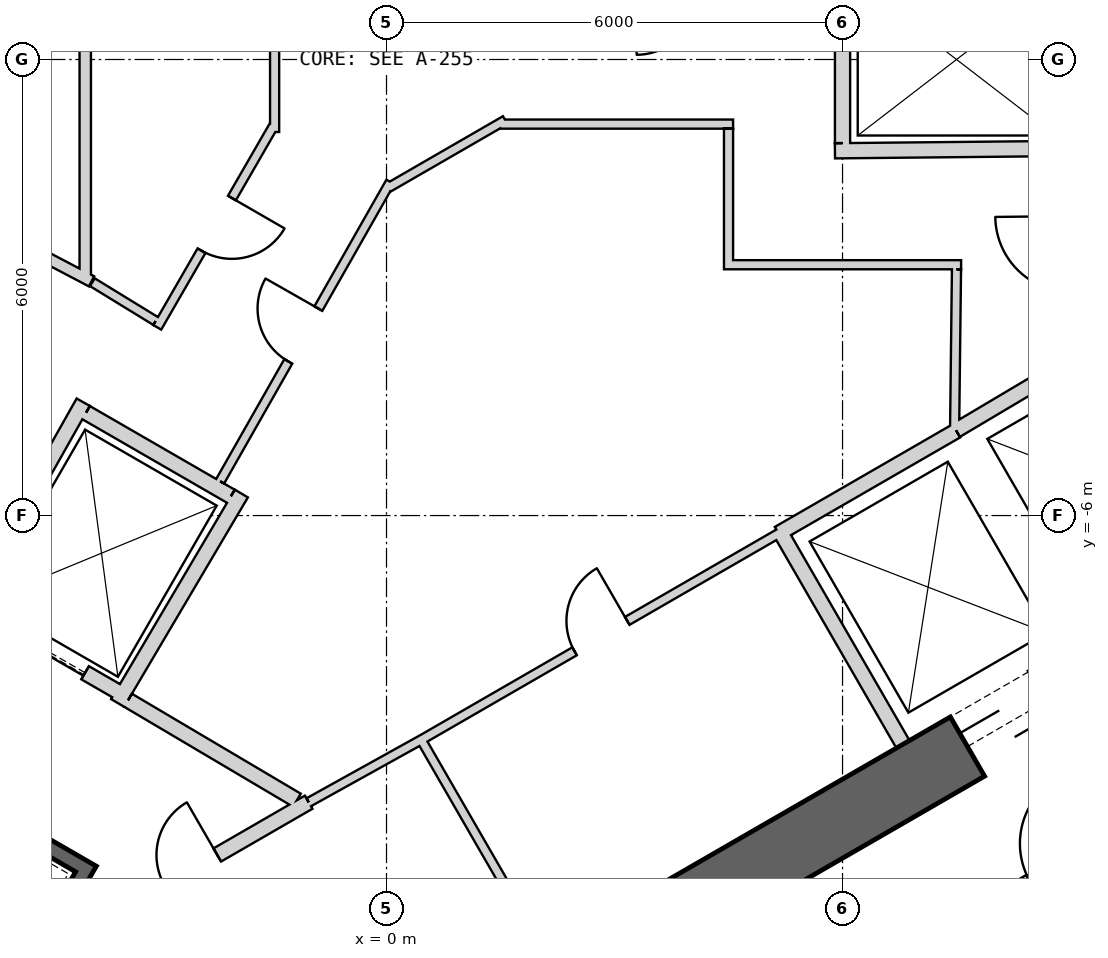
"""IFC4 building model, lengths in metres.
Left out: names, types, materials, properties, quantities, classifications, styles, units other than length and angle.
Written with IfcOpenShell. Run it as: python <this file> out.ifc"""

import sys

from ifc_helpers import new_model, si_unit, direction, frame, frame_2d, origin, place, context, subcontext, project, spatial, rectangle, extrude, element, fill, save


model = new_model("IFC4")
c1 = context("Model", 3, precision=1e-05, world=origin(), true_north=direction((0.0, 1.0)))
c2 = subcontext(c1, "Body", "Model", "MODEL_VIEW")
j1 = project(units=[si_unit("LENGTHUNIT", "METRE"), si_unit("PLANEANGLEUNIT", "RADIAN")], contexts=[c1])
p1 = place(None, origin())
s1 = spatial("IfcSite", under=j1, at=p1, CompositionType="ELEMENT")
p2 = place(p1, origin())
s2 = spatial("IfcBuilding", under=s1, at=p2, CompositionType="ELEMENT")
p3 = place(p2, frame((0.0, 0.0, 435.3)))
s3 = spatial("IfcBuildingStorey", under=s2, at=p3, CompositionType="ELEMENT", Elevation=435.3)
p4 = place(p3, frame((-7.825, -17.97, 0.0), z_axis=(0.0, 0.0, 1.0), x_axis=(0.866028369851, 0.499994862586, 0.0)))
e1 = element("IfcWall", 1, at=p4, inside=s3, PredefinedType="SHEAR", context=c2, shape_type="SweptSolid", body=[
    extrude(rectangle(XDim=31.523, YDim=0.9, at=frame_2d((15.762, 0.0))), origin(), (0.0, 0.0, 1.0), 5.0),
])
p5 = place(p4, frame((17.862, 0.0, 0.0)))
e2 = element("IfcOpeningElement", 2, at=p5, cuts=e1, PredefinedType="OPENING", context=c2, shape_type="SweptSolid", body=[
    extrude(rectangle(XDim=1.2, YDim=2.4, at=frame_2d((0.6, 1.2))), frame((0.0, 0.46, 0.0), z_axis=(0.0, -1.0, 0.0), x_axis=(1.0, 0.0, 0.0)), (0.0, 0.0, 1.0), 0.92),
])
p6 = place(p4, frame((20.562, 0.0, 0.0)))
e3 = element("IfcOpeningElement", 3, at=p6, cuts=e1, PredefinedType="OPENING", context=c2, shape_type="SweptSolid", body=[
    extrude(rectangle(XDim=1.2, YDim=2.4, at=frame_2d((0.6, 1.2))), frame((0.0, 0.46, 0.0), z_axis=(0.0, -1.0, 0.0), x_axis=(1.0, 0.0, 0.0)), (0.0, 0.0, 1.0), 0.92),
])
p7 = place(p4, frame((26.712, 0.0, 0.0)))
e4 = element("IfcOpeningElement", 4, at=p7, cuts=e1, PredefinedType="OPENING", context=c2, shape_type="SweptSolid", body=[
    extrude(rectangle(XDim=1.2, YDim=2.4, at=frame_2d((0.6, 1.2))), frame((0.0, 0.46, 0.0), z_axis=(0.0, -1.0, 0.0), x_axis=(1.0, 0.0, 0.0)), (0.0, 0.0, 1.0), 0.92),
])
p8 = place(p4, frame((3.612, 0.0, 0.0)))
e5 = element("IfcOpeningElement", 5, at=p8, cuts=e1, PredefinedType="OPENING", context=c2, shape_type="SweptSolid", body=[
    extrude(rectangle(XDim=1.2, YDim=2.4, at=frame_2d((0.6, 1.2))), frame((0.0, 0.46, 0.0), z_axis=(0.0, -1.0, 0.0), x_axis=(1.0, 0.0, 0.0)), (0.0, 0.0, 1.0), 0.92),
])
p9 = place(p3, frame((6.795, -9.01, 0.0), z_axis=(0.0, 0.0, 1.0), x_axis=(-0.499984717929, 0.866034226713, 0.0)))
e6 = element("IfcWall", 6, at=p9, inside=s3, PredefinedType="PLUMBINGWALL", context=c2, shape_type="SweptSolid", body=[
    extrude(rectangle(XDim=3.25, YDim=0.2, at=frame_2d((1.625, 0.0))), origin(), (0.0, 0.0, 1.0), 4.75),
])
p10 = place(p3, frame((5.159, -6.236, 0.0), z_axis=(0.0, 0.0, 1.0), x_axis=(0.866036505625, 0.499980770555, 0.0)))
e7 = element("IfcWall", 7, at=p10, inside=s3, PredefinedType="PLUMBINGWALL", context=c2, shape_type="SweptSolid", body=[
    extrude(rectangle(XDim=2.7, YDim=0.2, at=frame_2d((1.35, 0.0))), origin(), (0.0, 0.0, 1.0), 4.75),
])
p11 = place(p3, frame((7.493, -4.878, 0.0), z_axis=(0.0, 0.0, 1.0), x_axis=(0.859981807212, 0.510324691999, 0.0)))
e8 = element("IfcWall", 8, at=p11, inside=s3, PredefinedType="PLUMBINGWALL", context=c2, shape_type="SweptSolid", body=[
    extrude(rectangle(XDim=1.845, YDim=0.2, at=frame_2d((0.922, 0.0))), origin(), (0.0, 0.0, 1.0), 4.75),
])
p12 = place(p3, frame((6.0, -1.1, 0.0), z_axis=(0.0, 0.0, 1.0), x_axis=(0.0, 1.0, 0.0)))
e9 = element("IfcWall", 9, at=p12, inside=s3, PredefinedType="PLUMBINGWALL", context=c2, shape_type="SweptSolid", body=[
    extrude(rectangle(XDim=2.2, YDim=0.2, at=frame_2d((1.1, 0.0))), origin(), (0.0, 0.0, 1.0), 4.75),
])
p13 = place(p3, frame((5.9, -1.201, 0.0), z_axis=(0.0, 0.0, 1.0), x_axis=(0.999950064753, 0.009993397809, 0.0)))
e10 = element("IfcWall", 10, at=p13, inside=s3, PredefinedType="PLUMBINGWALL", context=c2, shape_type="SweptSolid", body=[
    extrude(rectangle(XDim=3.2, YDim=0.2, at=frame_2d((1.6, 0.0))), origin(), (0.0, 0.0, 1.0), 4.75),
])
p14 = place(p3, frame((-3.905, -10.563, -0.25), z_axis=(0.0, 0.0, 1.0), x_axis=(-0.500012932018, -0.866017937352, 0.0)))
e11 = element("IfcWall", 11, at=p14, inside=s3, PredefinedType="SHEAR", context=c2, shape_type="SweptSolid", body=[
    extrude(rectangle(XDim=8.1, YDim=0.2, at=frame_2d((4.05, 0.0))), origin(), (0.0, 0.0, 1.0), 5.0),
])
p15 = place(p3, frame((-4.041, -10.599, -0.25), z_axis=(0.0, 0.0, 1.0), x_axis=(-0.866047807691, 0.499961193289, 0.0)))
e12 = element("IfcWall", 12, at=p15, inside=s3, PredefinedType="SHEAR", context=c2, shape_type="SweptSolid", body=[
    extrude(rectangle(XDim=3.6, YDim=0.2, at=frame_2d((1.8, 0.0))), origin(), (0.0, 0.0, 1.0), 5.0),
])
p16 = place(p15, frame((1.25, 0.0, 0.25)))
e13 = element("IfcOpeningElement", 13, at=p16, cuts=e12, PredefinedType="OPENING", context=c2, shape_type="SweptSolid", body=[
    extrude(rectangle(XDim=1.1, YDim=2.1, at=frame_2d((0.55, 1.05))), frame((0.0, 0.11, 0.0), z_axis=(0.0, -1.0, 0.0), x_axis=(1.0, 0.0, 0.0)), (0.0, 0.0, 1.0), 0.22),
])
p17 = place(p3, frame((-3.446, -8.368, 0.0), z_axis=(0.0, 0.0, 1.0), x_axis=(-0.866024647952, 0.500001309137, 0.0)))
e14 = element("IfcWall", 14, at=p17, inside=s3, PredefinedType="PLUMBINGWALL", context=c2, shape_type="SweptSolid", body=[
    extrude(rectangle(XDim=2.4, YDim=0.2, at=frame_2d((1.2, 0.0))), origin(), (0.0, 0.0, 1.0), 4.75),
])
p18 = place(p17, frame((0.6, 0.0, 0.0)))
e15 = element("IfcOpeningElement", 15, at=p18, cuts=e14, PredefinedType="OPENING", context=c2, shape_type="SweptSolid", body=[
    extrude(rectangle(XDim=1.2, YDim=2.4, at=frame_2d((0.6, 1.2))), frame((0.0, 0.11, 0.0), z_axis=(0.0, -1.0, 0.0), x_axis=(1.0, 0.0, 0.0)), (0.0, 0.0, 1.0), 0.22),
])
p19 = place(p3, frame((-3.953, -4.646, 0.0), z_axis=(0.0, 0.0, 1.0), x_axis=(0.86605622881, -0.499946605688, 0.0)))
e16 = element("IfcWall", 16, at=p19, inside=s3, PredefinedType="PLUMBINGWALL", context=c2, shape_type="SweptSolid", body=[
    extrude(rectangle(XDim=2.2, YDim=0.2, at=frame_2d((1.1, 0.0))), origin(), (0.0, 0.0, 1.0), 4.75),
])
p20 = place(p3, frame((-1.91, -5.71, 0.0), z_axis=(0.0, 0.0, 1.0), x_axis=(-0.508616218331, -0.860993346345, 0.0)))
e17 = element("IfcWall", 17, at=p20, inside=s3, PredefinedType="PLUMBINGWALL", context=c2, shape_type="SweptSolid", body=[
    extrude(rectangle(XDim=3.2, YDim=0.2, at=frame_2d((1.6, 0.0))), origin(), (0.0, 0.0, 1.0), 4.75),
])
p21 = place(p3, frame((-3.99, -4.509, 0.0), z_axis=(0.0, 0.0, 1.0), x_axis=(-0.491358283181, -0.870957540612, 0.0)))
e18 = element("IfcWall", 18, at=p21, inside=s3, PredefinedType="PLUMBINGWALL", context=c2, shape_type="SweptSolid", body=[
    extrude(rectangle(XDim=3.2, YDim=0.2, at=frame_2d((1.6, 0.0))), origin(), (0.0, 0.0, 1.0), 4.75),
])
p22 = place(p3, frame((2.067, -11.74, 0.0), z_axis=(0.0, 0.0, 1.0), x_axis=(-0.499984717929, 0.866034226713, 0.0)))
e19 = element("IfcWall", 19, at=p22, inside=s3, PredefinedType="PARTITIONING", context=c2, shape_type="SweptSolid", body=[
    extrude(rectangle(XDim=3.25, YDim=0.12, at=frame_2d((1.625, 0.0))), origin(), (0.0, 0.0, 1.0), 4.75),
])
p23 = place(p3, frame((-1.024, -9.771, 0.0), z_axis=(0.0, 0.0, 1.0), x_axis=(-0.866029903013, -0.499992207027, 0.0)))
e20 = element("IfcWall", 20, at=p23, inside=s3, PredefinedType="PARTITIONING", context=c2, shape_type="SweptSolid", body=[
    extrude(rectangle(XDim=3.578, YDim=0.2, at=frame_2d((1.789, 0.0))), origin(), (0.0, 0.0, 1.0), 4.75),
])
p24 = place(p23, frame((1.389, 0.0, 0.0)))
e21 = element("IfcOpeningElement", 21, at=p24, cuts=e20, PredefinedType="OPENING", context=c2, shape_type="SweptSolid", body=[
    extrude(rectangle(XDim=0.8, YDim=2.1, at=frame_2d((0.4, 1.05))), frame((0.0, 0.11, 0.0), z_axis=(0.0, -1.0, 0.0), x_axis=(1.0, 0.0, 0.0)), (0.0, 0.0, 1.0), 0.22),
])
p25 = place(p3, frame((-1.023, -9.772, 0.0), z_axis=(0.0, 0.0, 1.0), x_axis=(0.874290944206, 0.485402250592, 0.0)))
e22 = element("IfcWall", 22, at=p25, inside=s3, PredefinedType="PARTITIONING", context=c2, shape_type="SweptSolid", body=[
    extrude(rectangle(XDim=1.723, YDim=0.12, at=frame_2d((0.861, 0.0))), origin(), (0.0, 0.0, 1.0), 4.75),
])
p26 = place(p3, frame((0.483, -8.936, 0.0), z_axis=(0.0, 0.0, 1.0), x_axis=(0.866028230842, 0.499995103361, 0.0)))
e23 = element("IfcWall", 23, at=p26, inside=s3, PredefinedType="PARTITIONING", context=c2, shape_type="SweptSolid", body=[
    extrude(rectangle(XDim=5.4, YDim=0.12, at=frame_2d((2.7, 0.0))), origin(), (0.0, 0.0, 1.0), 4.75),
])
p27 = place(p26, frame((2.3, 0.0, 0.0)))
e24 = element("IfcOpeningElement", 24, at=p27, cuts=e23, PredefinedType="OPENING", context=c2, shape_type="SweptSolid", body=[
    extrude(rectangle(XDim=0.8, YDim=2.1, at=frame_2d((0.4, 1.05))), frame((0.0, 0.07, 0.0), z_axis=(0.0, -1.0, 0.0), x_axis=(1.0, 0.0, 0.0)), (0.0, 0.0, 1.0), 0.14),
])
p28 = place(p3, frame((-3.401, -8.43, 0.0), z_axis=(0.0, 0.0, 1.0), x_axis=(0.860630814782, -0.509229418482, 0.0)))
e25 = element("IfcWall", 25, at=p28, inside=s3, PredefinedType="PARTITIONING", context=c2, shape_type="SweptSolid", body=[
    extrude(rectangle(XDim=2.582, YDim=0.2, at=frame_2d((1.291, 0.0))), origin(), (0.0, 0.0, 1.0), 4.75),
])
p29 = place(p3, frame((0.051, -1.611, 0.0), z_axis=(0.0, 0.0, 1.0), x_axis=(-0.49434454467, -0.869266053148, 0.0)))
e26 = element("IfcWall", 26, at=p29, inside=s3, PredefinedType="PARTITIONING", context=c2, shape_type="SweptSolid", body=[
    extrude(rectangle(XDim=4.53, YDim=0.12, at=frame_2d((2.265, 0.0))), origin(), (0.0, 0.0, 1.0), 4.75),
])
p30 = place(p29, frame((1.916, 0.0, 0.0)))
e27 = element("IfcOpeningElement", 27, at=p30, cuts=e26, PredefinedType="OPENING", context=c2, shape_type="SweptSolid", body=[
    extrude(rectangle(XDim=0.8, YDim=2.1, at=frame_2d((0.4, 1.05))), frame((0.0, 0.07, 0.0), z_axis=(0.0, -1.0, 0.0), x_axis=(1.0, 0.0, 0.0)), (0.0, 0.0, 1.0), 0.14),
])
p31 = place(p3, frame((1.562, -0.798, 0.0), z_axis=(0.0, 0.0, 1.0), x_axis=(-0.86601248742, -0.500022371132, 0.0)))
e28 = element("IfcWall", 28, at=p31, inside=s3, PredefinedType="PARTITIONING", context=c2, shape_type="SweptSolid", body=[
    extrude(rectangle(XDim=1.785, YDim=0.12, at=frame_2d((0.893, 0.0))), origin(), (0.0, 0.0, 1.0), 4.75),
])
p32 = place(p3, frame((4.56, -0.85, 0.0), z_axis=(0.0, 0.0, 1.0), x_axis=(-1.0, 0.0, 0.0)))
e29 = element("IfcWall", 29, at=p32, inside=s3, PredefinedType="PARTITIONING", context=c2, shape_type="SweptSolid", body=[
    extrude(rectangle(XDim=3.069, YDim=0.12, at=frame_2d((1.535, 0.0))), origin(), (0.0, 0.0, 1.0), 4.75),
])
p33 = place(p3, frame((4.5, -2.76, 0.0), z_axis=(0.0, 0.0, 1.0), x_axis=(0.0, 1.0, 0.0)))
e30 = element("IfcWall", 30, at=p33, inside=s3, PredefinedType="PARTITIONING", context=c2, shape_type="SweptSolid", body=[
    extrude(rectangle(XDim=1.85, YDim=0.12, at=frame_2d((0.925, 0.0))), origin(), (0.0, 0.0, 1.0), 4.75),
])
p34 = place(p3, frame((7.56, -2.7, 0.0), z_axis=(0.0, 0.0, 1.0), x_axis=(-1.0, 0.0, 0.0)))
e31 = element("IfcWall", 31, at=p34, inside=s3, PredefinedType="PARTITIONING", context=c2, shape_type="SweptSolid", body=[
    extrude(rectangle(XDim=3.0, YDim=0.12, at=frame_2d((1.5, 0.0))), origin(), (0.0, 0.0, 1.0), 4.75),
])
p35 = place(p3, frame((7.475, -4.865, 0.0), z_axis=(0.0, 0.0, 1.0), x_axis=(0.011716133148, 0.999931363757, 0.0)))
e32 = element("IfcWall", 32, at=p35, inside=s3, PredefinedType="PARTITIONING", context=c2, shape_type="SweptSolid", body=[
    extrude(rectangle(XDim=2.105, YDim=0.12, at=frame_2d((1.052, 0.0))), origin(), (0.0, 0.0, 1.0), 4.75),
])
p36 = place(p3, frame((-3.964, -2.908, 0.0), z_axis=(0.0, 0.0, 1.0), x_axis=(0.0, 1.0, 0.0)))
e33 = element("IfcWall", 33, at=p36, inside=s3, PredefinedType="PLUMBINGWALL", context=c2, shape_type="SweptSolid", body=[
    extrude(rectangle(XDim=5.815, YDim=0.15, at=frame_2d((2.908, 0.0))), origin(), (0.0, 0.0, 1.0), 4.75),
])
p37 = place(p3, frame((-4.655, -2.512, 0.0), z_axis=(0.0, 0.0, 1.0), x_axis=(0.885372046241, -0.464883146323, 0.0)))
e34 = element("IfcWall", 34, at=p37, inside=s3, PredefinedType="PLUMBINGWALL", context=c2, shape_type="SweptSolid", body=[
    extrude(rectangle(XDim=0.875, YDim=0.15, at=frame_2d((0.437, 0.0))), origin(), (0.0, 0.0, 1.0), 4.75),
])
p38 = place(p3, frame((-1.472, -0.954, 0.0), z_axis=(0.0, 0.0, 1.0), x_axis=(0.0, 1.0, 0.0)))
e35 = element("IfcWall", 35, at=p38, inside=s3, PredefinedType="PARTITIONING", context=c2, shape_type="SweptSolid", body=[
    extrude(rectangle(XDim=1.785, YDim=0.12, at=frame_2d((0.893, 0.0))), origin(), (0.0, 0.0, 1.0), 4.75),
])
p39 = place(p3, frame((-3.016, -3.524, 0.0), z_axis=(0.0, 0.0, 1.0), x_axis=(0.499988681553, 0.866031938394, 0.0)))
e36 = element("IfcWall", 36, at=p39, inside=s3, PredefinedType="PARTITIONING", context=c2, shape_type="SweptSolid", body=[
    extrude(rectangle(XDim=3.069, YDim=0.12, at=frame_2d((1.535, 0.0))), origin(), (0.0, 0.0, 1.0), 4.75),
])
p40 = place(p39, frame((1.165, 0.0, 0.0)))
e37 = element("IfcOpeningElement", 37, at=p40, cuts=e36, PredefinedType="OPENING", context=c2, shape_type="SweptSolid", body=[
    extrude(rectangle(XDim=0.8, YDim=2.1, at=frame_2d((0.4, 1.05))), frame((0.0, 0.07, 0.0), z_axis=(0.0, -1.0, 0.0), x_axis=(1.0, 0.0, 0.0)), (0.0, 0.0, 1.0), 0.14),
])
p41 = place(p3, frame((-3.87, -2.93, 0.0), z_axis=(0.0, 0.0, 1.0), x_axis=(0.852489850103, -0.522743776119, 0.0)))
e38 = element("IfcWall", 38, at=p41, inside=s3, PredefinedType="PARTITIONING", context=c2, shape_type="SweptSolid", body=[
    extrude(rectangle(XDim=0.977, YDim=0.12, at=frame_2d((0.488, 0.0))), origin(), (0.0, 0.0, 1.0), 4.75),
])
p42 = place(p3, frame((6.698, -11.837, 0.0), z_axis=(0.0, 0.0, 1.0), x_axis=(0.866022444471, 0.500005125646, 0.0)))
e39 = element("IfcWall", 39, at=p42, inside=s3, PredefinedType="PARTITIONING", context=c2, shape_type="SweptSolid", body=[
    extrude(rectangle(XDim=16.124, YDim=0.2, at=frame_2d((8.062, 0.0))), origin(), (0.0, 0.0, 1.0), 4.75),
])
p43 = place(p42, frame((2.044, 0.0, 0.0)))
e40 = element("IfcOpeningElement", 40, at=p43, cuts=e39, PredefinedType="OPENING", context=c2, shape_type="SweptSolid", body=[
    extrude(rectangle(XDim=1.0, YDim=2.1, at=frame_2d((0.5, 1.05))), frame((0.0, 0.11, 0.0), z_axis=(0.0, -1.0, 0.0), x_axis=(1.0, 0.0, 0.0)), (0.0, 0.0, 1.0), 0.22),
])
p44 = place(p18, origin())
e41 = element("IfcDoor", 41, at=p44, inside=s3, OperationType="SLIDING_TO_LEFT", PredefinedType="USERDEFINED", context=c2, shape_type="SweptSolid", body=[
    extrude(rectangle(XDim=1.2, YDim=2.4, at=frame_2d((0.6, 1.2))), frame((0.0, 0.025, 0.0), z_axis=(0.0, -1.0, 0.0), x_axis=(1.0, 0.0, 0.0)), (0.0, 0.0, 1.0), 0.05),
])
fill(e15, e41)
p45 = place(p30, origin())
e42 = element("IfcDoor", 42, at=p45, inside=s3, OperationType="SINGLE_SWING_LEFT", PredefinedType="USERDEFINED", context=c2, shape_type="SweptSolid", body=[
    extrude(rectangle(XDim=0.8, YDim=2.1, at=frame_2d((0.4, 1.05))), frame((0.0, 0.025, 0.0), z_axis=(0.0, -1.0, 0.0), x_axis=(1.0, 0.0, 0.0)), (0.0, 0.0, 1.0), 0.05),
])
fill(e27, e42)
p46 = place(p40, origin())
e43 = element("IfcDoor", 43, at=p46, inside=s3, OperationType="SINGLE_SWING_RIGHT", PredefinedType="USERDEFINED", context=c2, shape_type="SweptSolid", body=[
    extrude(rectangle(XDim=0.8, YDim=2.1, at=frame_2d((0.4, 1.05))), frame((0.0, 0.025, 0.0), z_axis=(0.0, -1.0, 0.0), x_axis=(1.0, 0.0, 0.0)), (0.0, 0.0, 1.0), 0.05),
])
fill(e37, e43)
p47 = place(p24, origin())
e44 = element("IfcDoor", 44, at=p47, inside=s3, OperationType="SINGLE_SWING_LEFT", PredefinedType="USERDEFINED", context=c2, shape_type="SweptSolid", body=[
    extrude(rectangle(XDim=0.8, YDim=2.1, at=frame_2d((0.4, 1.05))), frame((0.0, 0.025, 0.0), z_axis=(0.0, -1.0, 0.0), x_axis=(1.0, 0.0, 0.0)), (0.0, 0.0, 1.0), 0.05),
])
fill(e21, e44)
p48 = place(p27, origin())
e45 = element("IfcDoor", 45, at=p48, inside=s3, OperationType="SINGLE_SWING_RIGHT", PredefinedType="USERDEFINED", context=c2, shape_type="SweptSolid", body=[
    extrude(rectangle(XDim=0.8, YDim=2.1, at=frame_2d((0.4, 1.05))), frame((0.0, 0.025, 0.0), z_axis=(0.0, -1.0, 0.0), x_axis=(1.0, 0.0, 0.0)), (0.0, 0.0, 1.0), 0.05),
])
fill(e24, e45)
p49 = place(p5, origin())
e46 = element("IfcDoor", 46, at=p49, inside=s3, OperationType="SLIDING_TO_LEFT", PredefinedType="USERDEFINED", context=c2, shape_type="SweptSolid", body=[
    extrude(rectangle(XDim=1.2, YDim=2.4, at=frame_2d((0.6, 1.2))), frame((0.0, 0.025, 0.0), z_axis=(0.0, -1.0, 0.0), x_axis=(1.0, 0.0, 0.0)), (0.0, 0.0, 1.0), 0.05),
])
fill(e2, e46)
save(model, sys.argv[1])
